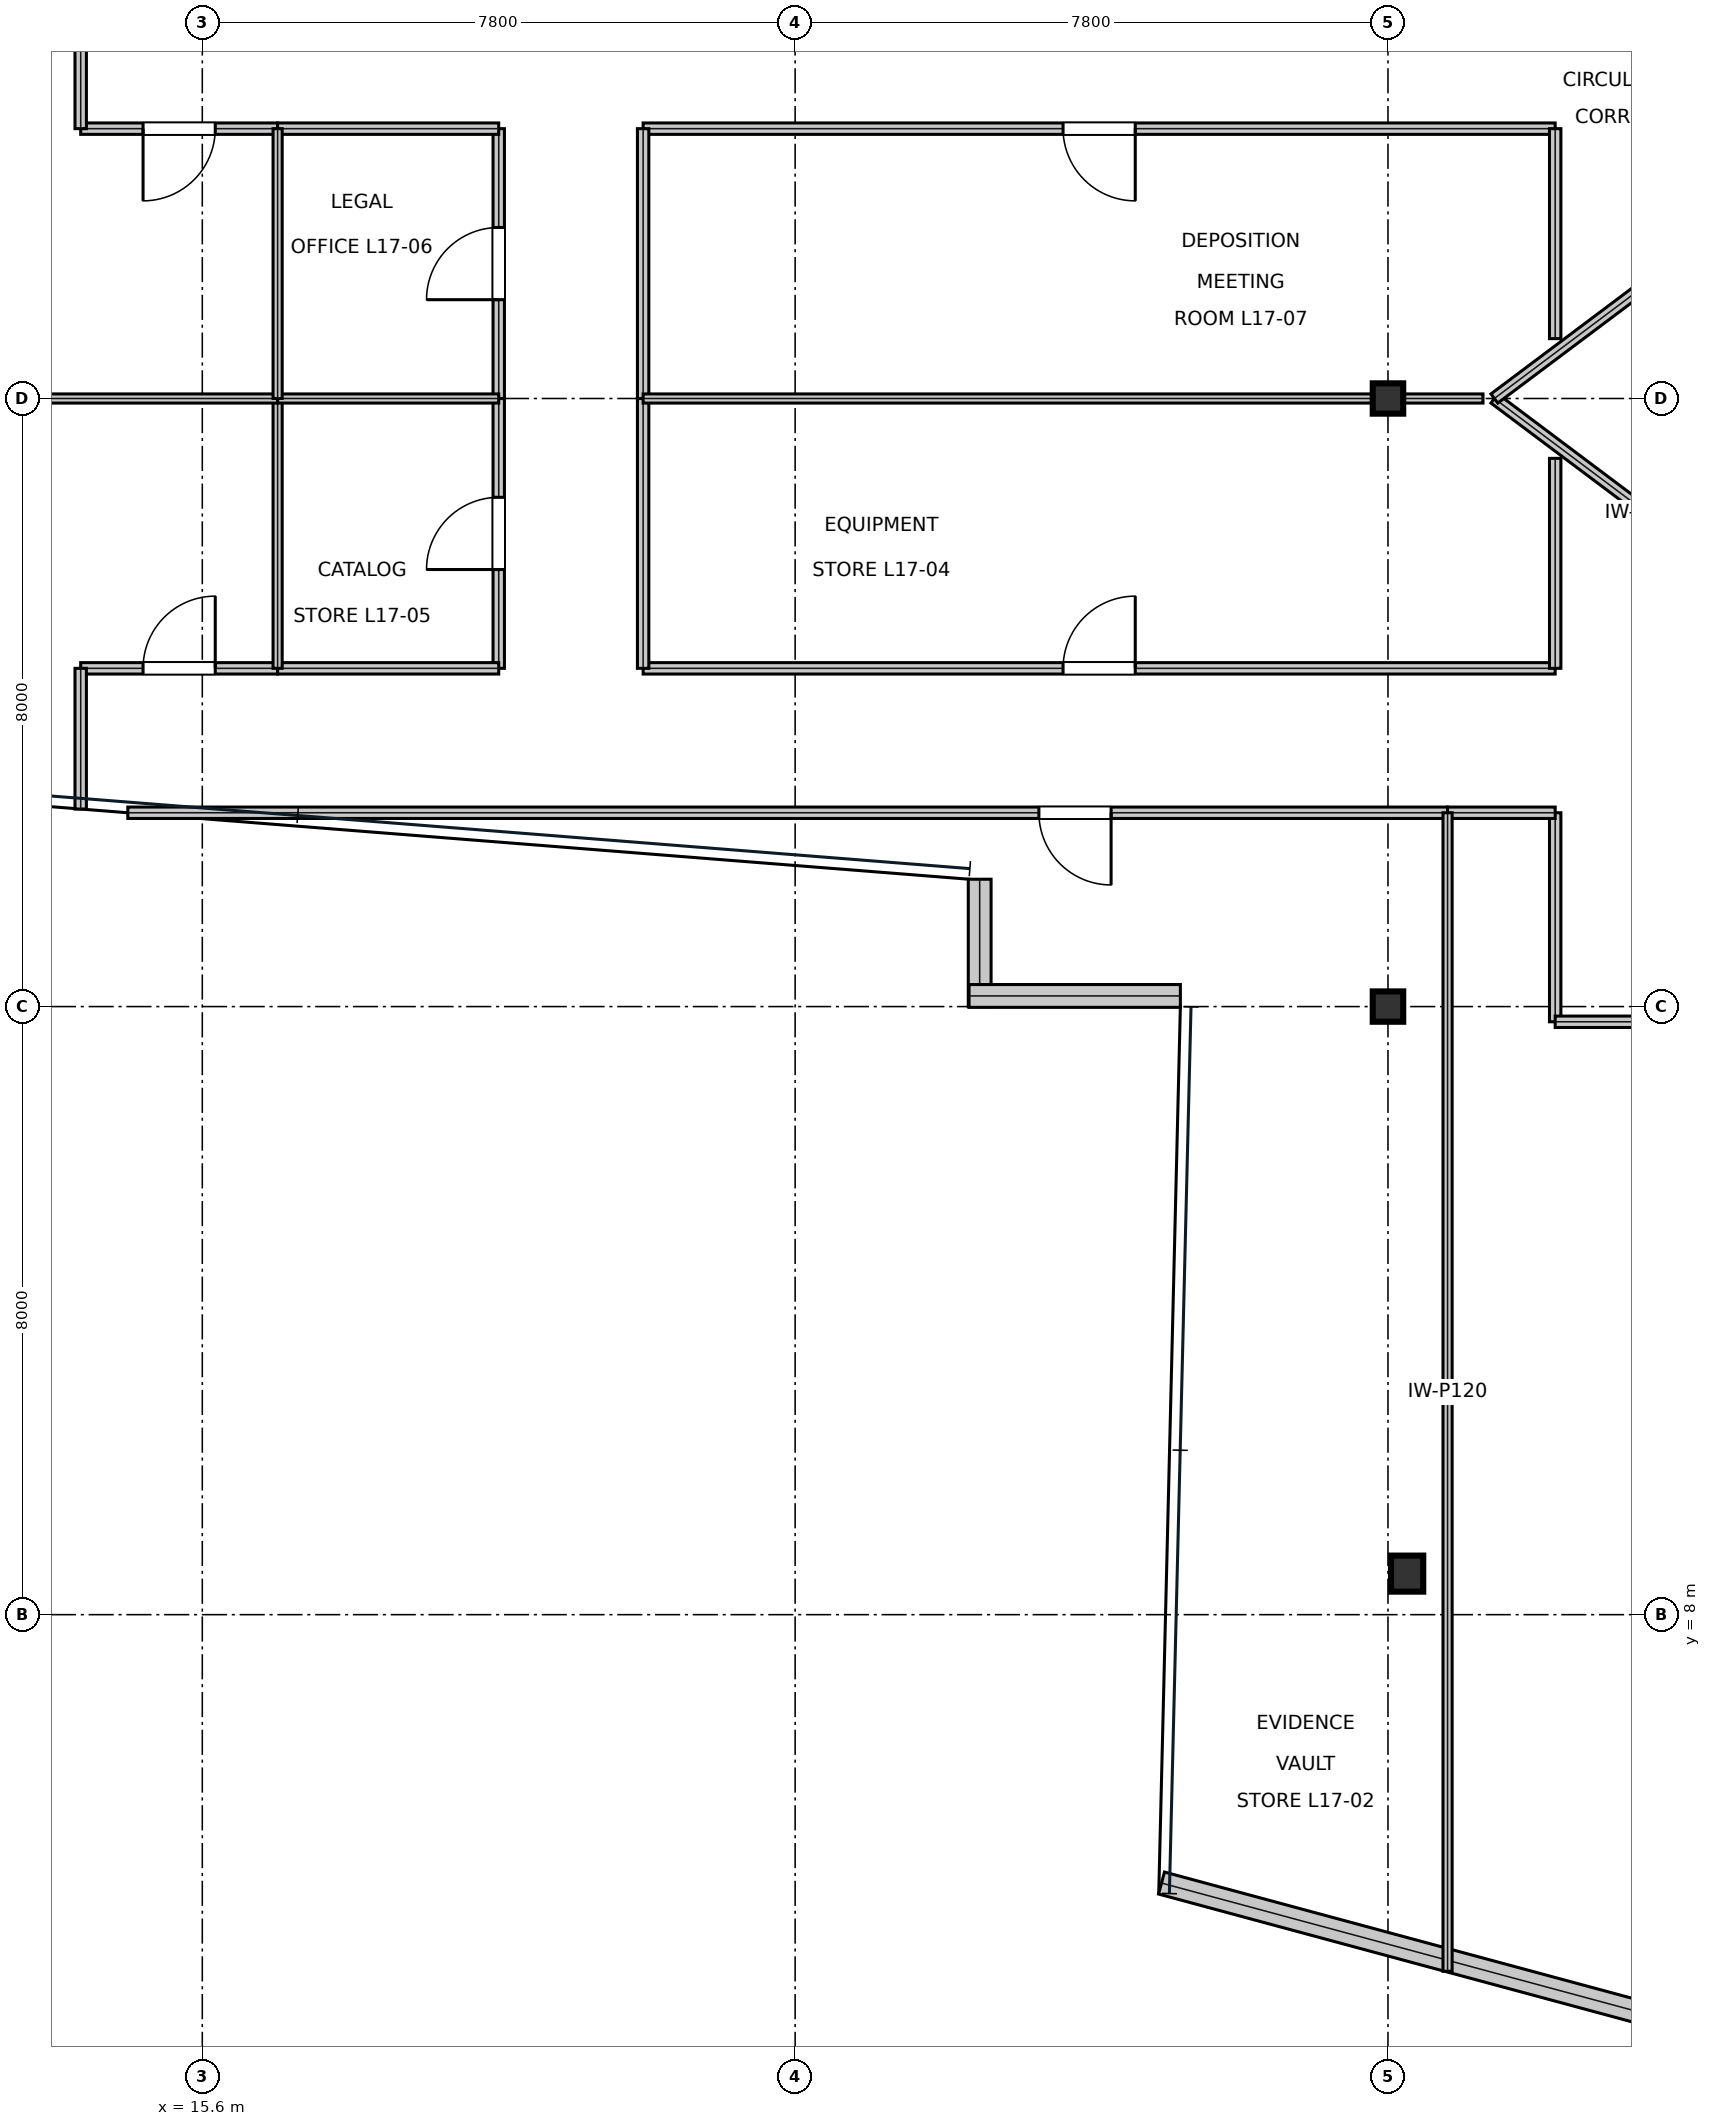
"""IFC4 building model, lengths in metres.
Left out: names, types, materials, properties, quantities, classifications, styles, units other than length and angle.
Written with IfcOpenShell. Run it as: python <this file> out.ifc"""

import sys

from ifc_helpers import new_model, si_unit, direction, frame, frame_2d, origin, origin_2d, place, context, subcontext, project, spatial, rectangle, i_section, extrude, element, fill, save


model = new_model("IFC4")
c1 = context("Model", 3, precision=1e-05, world=origin(), true_north=direction((0.0, 1.0)))
c2 = subcontext(c1, "Body", "Model", "MODEL_VIEW")
j1 = project(units=[si_unit("LENGTHUNIT", "METRE"), si_unit("PLANEANGLEUNIT", "RADIAN")], contexts=[c1])
p1 = place(None, origin())
s1 = spatial("IfcSite", under=j1, at=p1, CompositionType="ELEMENT")
p2 = place(p1, origin())
s2 = spatial("IfcBuilding", under=s1, at=p2, CompositionType="ELEMENT")
p3 = place(p2, frame((0.0, 0.0, 78.3)))
s3 = spatial("IfcBuildingStorey", under=s2, at=p3, CompositionType="ELEMENT", Elevation=78.3)
for number, where, z_axis, x_axis in (
    (1, (31.2, 16.0, 0.0), (0.0, 0.0, 1.0), (1.0, 0.0, 0.0)),
    (2, (31.2, 24.0, 0.0), (0.0, 0.0, 1.0), (1.0, 0.0, 0.0)),
):
    element("IfcColumn", number, at=place(p3, frame(where, z_axis=z_axis, x_axis=x_axis)), inside=s3, PredefinedType="COLUMN", context=c2, shape_type="SweptSolid", body=[
        extrude(i_section(OverallWidth=0.401, OverallDepth=0.399, WebThickness=0.025, FlangeThickness=0.04, at=origin_2d()), origin(), (0.0, 0.0, 1.0), 4.044),
    ])
p4 = place(p3, frame((31.452, 8.54, 0.016), z_axis=(0.0, 0.0, 1.0), x_axis=(1.0, 0.0, 0.0)))
e3 = element("IfcColumn", 3, at=p4, inside=s3, PredefinedType="COLUMN", context=c2, shape_type="SweptSolid", body=[
    extrude(i_section(OverallWidth=0.424, OverallDepth=0.474, WebThickness=0.048, FlangeThickness=0.077, at=origin_2d()), origin(), (0.0, 0.0, 1.0), 4.018),
])
p5 = place(p3, frame((25.828, 17.675, 0.0), z_axis=(0.0, 0.0, 1.0), x_axis=(0.0, -1.0, 0.0)))
e4 = element("IfcWall", 4, at=p5, inside=s3, PredefinedType="STANDARD", context=c2, shape_type="SweptSolid", body=[
    extrude(rectangle(XDim=1.675, YDim=0.3, at=frame_2d((0.838, 0.0))), origin(), (0.0, 0.0, 1.0), 3.338),
])
p6 = place(p3, frame((25.688, 16.14, 0.0), z_axis=(0.0, 0.0, 1.0), x_axis=(1.0, 0.0, 0.0)))
e5 = element("IfcWall", 5, at=p6, inside=s3, PredefinedType="STANDARD", context=c2, shape_type="SweptSolid", body=[
    extrude(rectangle(XDim=2.781, YDim=0.3, at=frame_2d((1.39, 0.0))), origin(), (0.0, 0.0, 1.0), 3.81),
])
p7 = place(p3, frame((28.22, 4.469, 0.0), z_axis=(0.0, 0.0, 1.0), x_axis=(0.965438319853, -0.260631637679, 0.0)))
e6 = element("IfcWall", 6, at=p7, inside=s3, PredefinedType="STANDARD", context=c2, shape_type="SweptSolid", body=[
    extrude(rectangle(XDim=6.983, YDim=0.3, at=frame_2d((3.492, 0.0))), origin(), (0.0, 0.0, 1.0), 3.81),
])
p8 = place(p3, frame((14.62, 18.55, 0.0), z_axis=(0.0, 0.0, 1.0), x_axis=(1.0, 0.0, 0.0)))
e7 = element("IfcWall", 7, at=p8, inside=s3, PredefinedType="PARTITIONING", context=c2, shape_type="SweptSolid", body=[
    extrude(rectangle(XDim=17.364, YDim=0.15, at=frame_2d((8.682, 0.0))), origin(), (0.0, 0.0, 1.0), 3.181),
])
p9 = place(p8, frame((11.987, 0.0, 0.0)))
e8 = element("IfcOpeningElement", 8, at=p9, cuts=e7, PredefinedType="OPENING", context=c2, shape_type="SweptSolid", body=[
    extrude(rectangle(XDim=0.95, YDim=2.15, at=frame_2d((0.475, 1.075))), frame((0.0, 0.085, 0.0), z_axis=(0.0, -1.0, 0.0), x_axis=(1.0, 0.0, 0.0)), (0.0, 0.0, 1.0), 0.17),
])
p10 = place(p3, frame((14.0, 20.45, 0.0), z_axis=(0.0, 0.0, 1.0), x_axis=(1.0, 0.0, 0.0)))
e9 = element("IfcWall", 9, at=p10, inside=s3, PredefinedType="PARTITIONING", context=c2, shape_type="SweptSolid", body=[
    extrude(rectangle(XDim=2.591, YDim=0.15, at=frame_2d((1.295, 0.0))), origin(), (0.0, 0.0, 1.0), 3.391),
])
p11 = place(p10, frame((0.821, 0.0, 0.0)))
e10 = element("IfcOpeningElement", 10, at=p11, cuts=e9, PredefinedType="OPENING", context=c2, shape_type="SweptSolid", body=[
    extrude(rectangle(XDim=0.95, YDim=2.15, at=frame_2d((0.475, 1.075))), frame((0.0, 0.085, 0.0), z_axis=(0.0, -1.0, 0.0), x_axis=(1.0, 0.0, 0.0)), (0.0, 0.0, 1.0), 0.17),
])
p12 = place(p3, frame((21.4, 20.45, 0.0), z_axis=(0.0, 0.0, 1.0), x_axis=(1.0, 0.0, 0.0)))
e11 = element("IfcWall", 11, at=p12, inside=s3, PredefinedType="PARTITIONING", context=c2, shape_type="SweptSolid", body=[
    extrude(rectangle(XDim=12.0, YDim=0.15, at=frame_2d((6.0, 0.0))), origin(), (0.0, 0.0, 1.0), 3.181),
])
p13 = place(p12, frame((5.525, 0.0, 0.0)))
e12 = element("IfcOpeningElement", 12, at=p13, cuts=e11, PredefinedType="OPENING", context=c2, shape_type="SweptSolid", body=[
    extrude(rectangle(XDim=0.95, YDim=2.15, at=frame_2d((0.475, 1.075))), frame((0.0, 0.085, 0.0), z_axis=(0.0, -1.0, 0.0), x_axis=(1.0, 0.0, 0.0)), (0.0, 0.0, 1.0), 0.17),
])
p14 = place(p3, frame((19.5, 20.45, 0.0), z_axis=(0.0, 0.0, 1.0), x_axis=(0.0, 1.0, 0.0)))
e13 = element("IfcWall", 13, at=p14, inside=s3, PredefinedType="PARTITIONING", context=c2, shape_type="SweptSolid", body=[
    extrude(rectangle(XDim=3.55, YDim=0.15, at=frame_2d((1.775, 0.0))), origin(), (0.0, 0.0, 1.0), 3.181),
])
p15 = place(p14, frame((1.3, 0.0, 0.0)))
e14 = element("IfcOpeningElement", 14, at=p15, cuts=e13, PredefinedType="OPENING", context=c2, shape_type="SweptSolid", body=[
    extrude(rectangle(XDim=0.95, YDim=2.15, at=frame_2d((0.475, 1.075))), frame((0.0, 0.085, 0.0), z_axis=(0.0, -1.0, 0.0), x_axis=(1.0, 0.0, 0.0)), (0.0, 0.0, 1.0), 0.17),
])
p16 = place(p3, frame((19.5, 24.0, 0.0), z_axis=(0.0, 0.0, 1.0), x_axis=(0.0, 1.0, 0.0)))
e15 = element("IfcWall", 15, at=p16, inside=s3, PredefinedType="PARTITIONING", context=c2, shape_type="SweptSolid", body=[
    extrude(rectangle(XDim=3.55, YDim=0.15, at=frame_2d((1.775, 0.0))), origin(), (0.0, 0.0, 1.0), 3.181),
])
p17 = place(p16, frame((1.3, 0.0, 0.0)))
e16 = element("IfcOpeningElement", 16, at=p17, cuts=e15, PredefinedType="OPENING", context=c2, shape_type="SweptSolid", body=[
    extrude(rectangle(XDim=0.95, YDim=2.15, at=frame_2d((0.475, 1.075))), frame((0.0, 0.085, 0.0), z_axis=(0.0, -1.0, 0.0), x_axis=(1.0, 0.0, 0.0)), (0.0, 0.0, 1.0), 0.17),
])
p18 = place(p3, frame((21.4, 27.55, 0.0), z_axis=(0.0, 0.0, 1.0), x_axis=(1.0, 0.0, 0.0)))
e17 = element("IfcWall", 17, at=p18, inside=s3, PredefinedType="PARTITIONING", context=c2, shape_type="SweptSolid", body=[
    extrude(rectangle(XDim=12.0, YDim=0.15, at=frame_2d((6.0, 0.0))), origin(), (0.0, 0.0, 1.0), 3.181),
])
p19 = place(p18, frame((5.525, 0.0, 0.0)))
e18 = element("IfcOpeningElement", 18, at=p19, cuts=e17, PredefinedType="OPENING", context=c2, shape_type="SweptSolid", body=[
    extrude(rectangle(XDim=0.95, YDim=2.15, at=frame_2d((0.475, 1.075))), frame((0.0, 0.085, 0.0), z_axis=(0.0, -1.0, 0.0), x_axis=(1.0, 0.0, 0.0)), (0.0, 0.0, 1.0), 0.17),
])
p20 = place(p3, frame((14.0, 27.55, 0.0), z_axis=(0.0, 0.0, 1.0), x_axis=(1.0, 0.0, 0.0)))
e19 = element("IfcWall", 19, at=p20, inside=s3, PredefinedType="PARTITIONING", context=c2, shape_type="SweptSolid", body=[
    extrude(rectangle(XDim=2.591, YDim=0.15, at=frame_2d((1.295, 0.0))), origin(), (0.0, 0.0, 1.0), 3.81),
])
p21 = place(p20, frame((0.821, 0.0, 0.0)))
e20 = element("IfcOpeningElement", 20, at=p21, cuts=e19, PredefinedType="OPENING", context=c2, shape_type="SweptSolid", body=[
    extrude(rectangle(XDim=0.95, YDim=2.15, at=frame_2d((0.475, 1.075))), frame((0.0, 0.085, 0.0), z_axis=(0.0, -1.0, 0.0), x_axis=(1.0, 0.0, 0.0)), (0.0, 0.0, 1.0), 0.17),
])
p22 = place(p3, frame((33.4, 15.8, 0.0), z_axis=(0.0, 0.0, 1.0), x_axis=(0.0, 1.0, 0.0)))
e21 = element("IfcWall", 21, at=p22, inside=s3, PredefinedType="PARTITIONING", context=c2, shape_type="SweptSolid", body=[
    extrude(rectangle(XDim=2.75, YDim=0.15, at=frame_2d((1.375, 0.0))), origin(), (0.0, 0.0, 1.0), 3.181),
])
p23 = place(p3, frame((33.4, 15.8, 0.0), z_axis=(0.0, 0.0, 1.0), x_axis=(1.0, 0.0, 0.0)))
e22 = element("IfcWall", 22, at=p23, inside=s3, PredefinedType="PARTITIONING", context=c2, shape_type="SweptSolid", body=[
    extrude(rectangle(XDim=1.9, YDim=0.15, at=frame_2d((0.95, 0.0))), origin(), (0.0, 0.0, 1.0), 3.181),
])
p24 = place(p3, frame((31.984, 18.55, 0.0), z_axis=(0.0, 0.0, 1.0), x_axis=(1.0, 0.0, 0.0)))
e23 = element("IfcWall", 23, at=p24, inside=s3, PredefinedType="PARTITIONING", context=c2, shape_type="SweptSolid", body=[
    extrude(rectangle(XDim=1.416, YDim=0.15, at=frame_2d((0.708, 0.0))), origin(), (0.0, 0.0, 1.0), 3.81),
])
p25 = place(p3, frame((14.0, 18.599, 0.0), z_axis=(0.0, 0.0, 1.0), x_axis=(0.0, 1.0, 0.0)))
e24 = element("IfcWall", 24, at=p25, inside=s3, PredefinedType="PARTITIONING", context=c2, shape_type="SweptSolid", body=[
    extrude(rectangle(XDim=1.851, YDim=0.15, at=frame_2d((0.925, 0.0))), origin(), (0.0, 0.0, 1.0), 3.338),
])
p26 = place(p3, frame((21.4, 20.45, 0.0), z_axis=(0.0, 0.0, 1.0), x_axis=(0.0, 1.0, 0.0)))
e25 = element("IfcWall", 25, at=p26, inside=s3, PredefinedType="PARTITIONING", context=c2, shape_type="SweptSolid", body=[
    extrude(rectangle(XDim=3.55, YDim=0.15, at=frame_2d((1.775, 0.0))), origin(), (0.0, 0.0, 1.0), 3.181),
])
p27 = place(p3, frame((33.4, 20.45, 0.0), z_axis=(0.0, 0.0, 1.0), x_axis=(0.0, 1.0, 0.0)))
e26 = element("IfcWall", 26, at=p27, inside=s3, PredefinedType="PARTITIONING", context=c2, shape_type="SweptSolid", body=[
    extrude(rectangle(XDim=2.762, YDim=0.15, at=frame_2d((1.381, 0.0))), origin(), (0.0, 0.0, 1.0), 3.81),
])
p28 = place(p3, frame((16.591, 20.45, 0.0), z_axis=(0.0, 0.0, 1.0), x_axis=(1.0, 0.0, 0.0)))
e27 = element("IfcWall", 27, at=p28, inside=s3, PredefinedType="PARTITIONING", context=c2, shape_type="SweptSolid", body=[
    extrude(rectangle(XDim=2.909, YDim=0.15, at=frame_2d((1.455, 0.0))), origin(), (0.0, 0.0, 1.0), 3.81),
])
p29 = place(p3, frame((16.591, 27.55, 0.0), z_axis=(0.0, 0.0, 1.0), x_axis=(1.0, 0.0, 0.0)))
e28 = element("IfcWall", 28, at=p29, inside=s3, PredefinedType="PARTITIONING", context=c2, shape_type="SweptSolid", body=[
    extrude(rectangle(XDim=2.909, YDim=0.15, at=frame_2d((1.455, 0.0))), origin(), (0.0, 0.0, 1.0), 3.391),
])
p30 = place(p3, frame((21.4, 24.0, 0.0), z_axis=(0.0, 0.0, 1.0), x_axis=(0.0, 1.0, 0.0)))
e29 = element("IfcWall", 29, at=p30, inside=s3, PredefinedType="PARTITIONING", context=c2, shape_type="SweptSolid", body=[
    extrude(rectangle(XDim=3.55, YDim=0.15, at=frame_2d((1.775, 0.0))), origin(), (0.0, 0.0, 1.0), 3.181),
])
p31 = place(p3, frame((33.4, 24.788, 0.0), z_axis=(0.0, 0.0, 1.0), x_axis=(0.0, 1.0, 0.0)))
e30 = element("IfcWall", 30, at=p31, inside=s3, PredefinedType="PARTITIONING", context=c2, shape_type="SweptSolid", body=[
    extrude(rectangle(XDim=2.762, YDim=0.15, at=frame_2d((1.381, 0.0))), origin(), (0.0, 0.0, 1.0), 3.81),
])
p32 = place(p3, frame((14.0, 27.55, 0.0), z_axis=(0.0, 0.0, 1.0), x_axis=(0.0, 1.0, 0.0)))
e31 = element("IfcWall", 31, at=p32, inside=s3, PredefinedType="PARTITIONING", context=c2, shape_type="SweptSolid", body=[
    extrude(rectangle(XDim=1.851, YDim=0.15, at=frame_2d((0.925, 0.0))), origin(), (0.0, 0.0, 1.0), 3.338),
])
p33 = place(p3, frame((31.984, 3.308, 0.0), z_axis=(0.0, 0.0, 1.0), x_axis=(0.0, 1.0, 0.0)))
e32 = element("IfcWall", 32, at=p33, inside=s3, PredefinedType="PARTITIONING", context=c2, shape_type="SweptSolid", body=[
    extrude(rectangle(XDim=15.242, YDim=0.12, at=frame_2d((7.621, 0.0))), origin(), (0.0, 0.0, 1.0), 3.181),
])
p34 = place(p3, frame((16.591, 20.45, 0.0), z_axis=(0.0, 0.0, 1.0), x_axis=(0.0, 1.0, 0.0)))
e33 = element("IfcWall", 33, at=p34, inside=s3, PredefinedType="PARTITIONING", context=c2, shape_type="SweptSolid", body=[
    extrude(rectangle(XDim=3.55, YDim=0.12, at=frame_2d((1.775, 0.0))), origin(), (0.0, 0.0, 1.0), 3.181),
])
p35 = place(p3, frame((5.816, 24.0, 0.0), z_axis=(0.0, 0.0, 1.0), x_axis=(1.0, 0.0, 0.0)))
e34 = element("IfcWall", 34, at=p35, inside=s3, PredefinedType="PARTITIONING", context=c2, shape_type="SweptSolid", body=[
    extrude(rectangle(XDim=10.775, YDim=0.12, at=frame_2d((5.388, 0.0))), origin(), (0.0, 0.0, 1.0), 3.338),
])
p36 = place(p3, frame((21.4, 24.0, 0.0), z_axis=(0.0, 0.0, 1.0), x_axis=(1.0, 0.0, 0.0)))
e35 = element("IfcWall", 35, at=p36, inside=s3, PredefinedType="PARTITIONING", context=c2, shape_type="SweptSolid", body=[
    extrude(rectangle(XDim=11.05, YDim=0.12, at=frame_2d((5.525, 0.0))), origin(), (0.0, 0.0, 1.0), 3.181),
])
p37 = place(p3, frame((16.591, 24.0, 0.0), z_axis=(0.0, 0.0, 1.0), x_axis=(1.0, 0.0, 0.0)))
e36 = element("IfcWall", 36, at=p37, inside=s3, PredefinedType="PARTITIONING", context=c2, shape_type="SweptSolid", body=[
    extrude(rectangle(XDim=2.909, YDim=0.12, at=frame_2d((1.455, 0.0))), origin(), (0.0, 0.0, 1.0), 3.391),
])
p38 = place(p3, frame((16.591, 24.0, 0.0), z_axis=(0.0, 0.0, 1.0), x_axis=(0.0, 1.0, 0.0)))
e37 = element("IfcWall", 37, at=p38, inside=s3, PredefinedType="PARTITIONING", context=c2, shape_type="SweptSolid", body=[
    extrude(rectangle(XDim=3.55, YDim=0.12, at=frame_2d((1.775, 0.0))), origin(), (0.0, 0.0, 1.0), 3.181),
])
for number, where, z_axis, x_axis in (
    (38, (32.6, 24.0, 0.0), (0.0, 0.0, 1.0), (0.8, -0.6, 0.0)),
    (39, (36.6, 27.0, 0.0), (0.0, 0.0, 1.0), (-0.8, -0.6, 0.0)),
):
    element("IfcWall", number, at=place(p3, frame(where, z_axis=z_axis, x_axis=x_axis)), inside=s3, PredefinedType="MOVABLE", context=c2, shape_type="SweptSolid", body=[
        extrude(rectangle(XDim=5.0, YDim=0.15, at=frame_2d((2.5, 0.0))), origin(), (0.0, 0.0, 1.0), 3.81),
    ])
p39 = place(p9, frame((0.95, 0.0, 0.0), z_axis=(0.0, 0.0, 1.0), x_axis=(-1.0, 0.0, 0.0)))
e40 = element("IfcDoor", 40, at=p39, inside=s3, OperationType="SINGLE_SWING_LEFT", PredefinedType="DOOR", context=c2, shape_type="SweptSolid", body=[
    extrude(rectangle(XDim=0.95, YDim=2.15, at=frame_2d((0.475, 1.075))), frame((0.0, 0.025, 0.0), z_axis=(0.0, -1.0, 0.0), x_axis=(1.0, 0.0, 0.0)), (0.0, 0.0, 1.0), 0.05),
])
fill(e8, e40)
p40 = place(p11, origin())
e41 = element("IfcDoor", 41, at=p40, inside=s3, OperationType="SINGLE_SWING_RIGHT", PredefinedType="DOOR", context=c2, shape_type="SweptSolid", body=[
    extrude(rectangle(XDim=0.95, YDim=2.15, at=frame_2d((0.475, 1.075))), frame((0.0, 0.025, 0.0), z_axis=(0.0, -1.0, 0.0), x_axis=(1.0, 0.0, 0.0)), (0.0, 0.0, 1.0), 0.05),
])
fill(e10, e41)
p41 = place(p13, origin())
e42 = element("IfcDoor", 42, at=p41, inside=s3, OperationType="SINGLE_SWING_RIGHT", PredefinedType="DOOR", context=c2, shape_type="SweptSolid", body=[
    extrude(rectangle(XDim=0.95, YDim=2.15, at=frame_2d((0.475, 1.075))), frame((0.0, 0.025, 0.0), z_axis=(0.0, -1.0, 0.0), x_axis=(1.0, 0.0, 0.0)), (0.0, 0.0, 1.0), 0.05),
])
fill(e12, e42)
p42 = place(p15, origin())
e43 = element("IfcDoor", 43, at=p42, inside=s3, OperationType="SINGLE_SWING_LEFT", PredefinedType="DOOR", context=c2, shape_type="SweptSolid", body=[
    extrude(rectangle(XDim=0.95, YDim=2.15, at=frame_2d((0.475, 1.075))), frame((0.0, 0.025, 0.0), z_axis=(0.0, -1.0, 0.0), x_axis=(1.0, 0.0, 0.0)), (0.0, 0.0, 1.0), 0.05),
])
fill(e14, e43)
p43 = place(p17, origin())
e44 = element("IfcDoor", 44, at=p43, inside=s3, OperationType="SINGLE_SWING_LEFT", PredefinedType="DOOR", context=c2, shape_type="SweptSolid", body=[
    extrude(rectangle(XDim=0.95, YDim=2.15, at=frame_2d((0.475, 1.075))), frame((0.0, 0.025, 0.0), z_axis=(0.0, -1.0, 0.0), x_axis=(1.0, 0.0, 0.0)), (0.0, 0.0, 1.0), 0.05),
])
fill(e16, e44)
p44 = place(p19, frame((0.95, 0.0, 0.0), z_axis=(0.0, 0.0, 1.0), x_axis=(-1.0, 0.0, 0.0)))
e45 = element("IfcDoor", 45, at=p44, inside=s3, OperationType="SINGLE_SWING_LEFT", PredefinedType="DOOR", context=c2, shape_type="SweptSolid", body=[
    extrude(rectangle(XDim=0.95, YDim=2.15, at=frame_2d((0.475, 1.075))), frame((0.0, 0.025, 0.0), z_axis=(0.0, -1.0, 0.0), x_axis=(1.0, 0.0, 0.0)), (0.0, 0.0, 1.0), 0.05),
])
fill(e18, e45)
p45 = place(p21, frame((0.95, 0.0, 0.0), z_axis=(0.0, 0.0, 1.0), x_axis=(-1.0, 0.0, 0.0)))
e46 = element("IfcDoor", 46, at=p45, inside=s3, OperationType="SINGLE_SWING_RIGHT", PredefinedType="DOOR", context=c2, shape_type="SweptSolid", body=[
    extrude(rectangle(XDim=0.95, YDim=2.15, at=frame_2d((0.475, 1.075))), frame((0.0, 0.025, 0.0), z_axis=(0.0, -1.0, 0.0), x_axis=(1.0, 0.0, 0.0)), (0.0, 0.0, 1.0), 0.05),
])
fill(e20, e46)
save(model, sys.argv[1])
